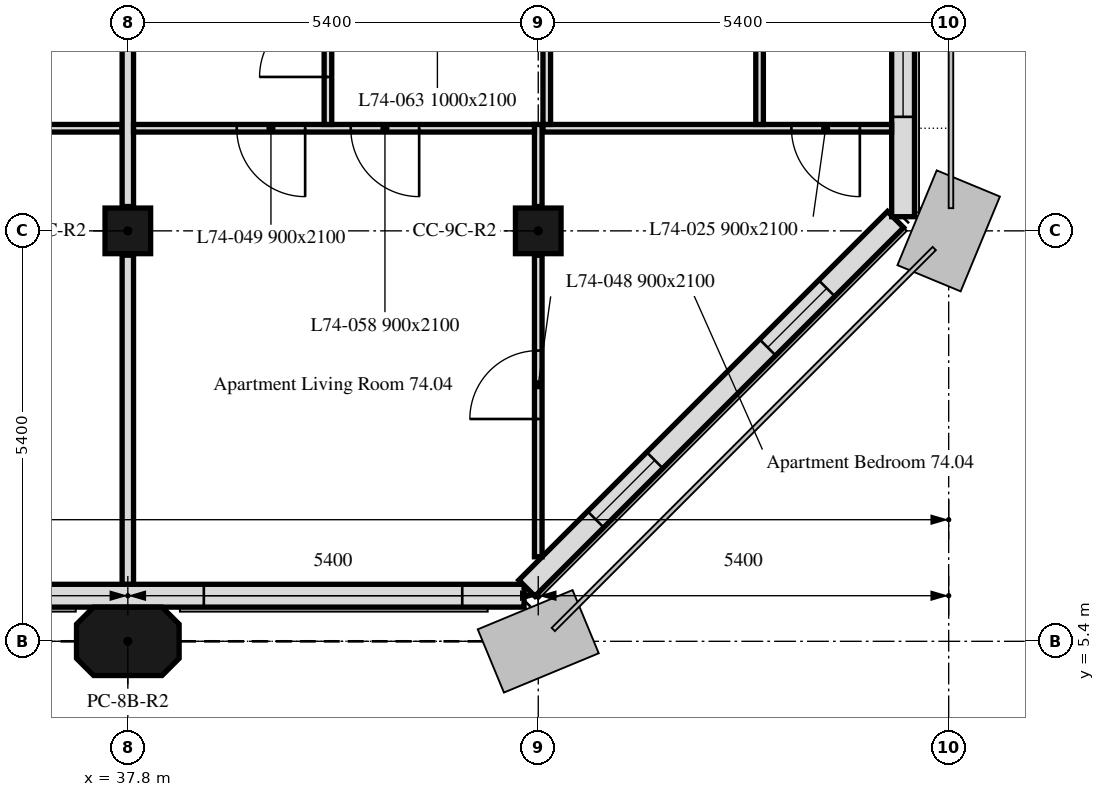
"""IFC4 building model, lengths in metres.
Left out: names, types, materials, properties, quantities, classifications, styles, units other than length and angle.
Written with IfcOpenShell. Run it as: python <this file> out.ifc"""

import sys

from ifc_helpers import new_model, si_unit, direction, frame, frame_2d, origin, origin_2d, place, context, subcontext, project, spatial, polyline, rectangle, outline, extrude, element, fill, save


model = new_model("IFC4")
c1 = context("Model", 3, precision=1e-05, world=origin(), true_north=direction((0.0, 1.0)))
c2 = subcontext(c1, "Body", "Model", "MODEL_VIEW")
j1 = project(units=[si_unit("LENGTHUNIT", "METRE"), si_unit("PLANEANGLEUNIT", "RADIAN")], contexts=[c1])
p1 = place(None, origin())
s1 = spatial("IfcSite", under=j1, at=p1, CompositionType="ELEMENT")
p2 = place(p1, origin())
s2 = spatial("IfcBuilding", under=s1, at=p2, CompositionType="ELEMENT")
p3 = place(p2, frame((0.0, 0.0, 298.3)))
s3 = spatial("IfcBuildingStorey", under=s2, at=p3, CompositionType="ELEMENT", Elevation=298.3)
p4 = place(p3, frame((37.8, 5.4, 0.0), z_axis=(0.0, 0.0, 1.0), x_axis=(1.0, 0.0, 0.0)))
e1 = element("IfcColumn", 1, at=p4, inside=s3, PredefinedType="COLUMN", context=c2, shape_type="SweptSolid", body=[
    extrude(outline(polyline([(-0.45, -0.45), (0.45, -0.45), (0.675, -0.225), (0.675, 0.225), (0.45, 0.45), (-0.45, 0.45), (-0.675, 0.225), (-0.675, -0.225), (-0.45, -0.45)])), origin(), (0.0, 0.0, 1.0), 3.0),
])
for number, where, z_axis, x_axis in (
    (2, (37.8, 10.8, 0.0), (0.0, 0.0, 1.0), (1.0, 0.0, 0.0)),
    (3, (43.2, 10.8, 0.0), (0.0, 0.0, 1.0), (1.0, 0.0, 0.0)),
):
    element("IfcColumn", number, at=place(p3, frame(where, z_axis=z_axis, x_axis=x_axis)), inside=s3, PredefinedType="COLUMN", context=c2, shape_type="SweptSolid", body=[
        extrude(rectangle(XDim=0.6, YDim=0.6, at=origin_2d()), origin(), (0.0, 0.0, 1.0), 3.0),
    ])
p5 = place(p3, frame((10.986, 6.0, 0.0), z_axis=(0.0, 0.0, 1.0), x_axis=(1.0, 0.0, 0.0)))
e4 = element("IfcWall", 4, at=p5, inside=s3, PredefinedType="SOLIDWALL", context=c2, shape_type="SweptSolid", body=[
    extrude(rectangle(XDim=32.027, YDim=0.3, at=frame_2d((16.014, 0.0))), origin(), (0.0, 0.0, 1.0), 3.0),
])
p6 = place(p5, frame((2.764, 0.0, 0.9)))
e5 = element("IfcOpeningElement", 5, at=p6, cuts=e4, PredefinedType="OPENING", context=c2, shape_type="SweptSolid", body=[
    extrude(rectangle(XDim=1.1, YDim=1.7, at=frame_2d((0.55, 0.85))), frame((0.0, 0.16, 0.0), z_axis=(0.0, -1.0, 0.0), x_axis=(1.0, 0.0, 0.0)), (0.0, 0.0, 1.0), 0.32),
])
p7 = place(p5, frame((6.214, 0.0, 0.9)))
e6 = element("IfcOpeningElement", 6, at=p7, cuts=e4, PredefinedType="OPENING", context=c2, shape_type="SweptSolid", body=[
    extrude(rectangle(XDim=3.4, YDim=1.7, at=frame_2d((1.7, 0.85))), frame((0.0, 0.16, 0.0), z_axis=(0.0, -1.0, 0.0), x_axis=(1.0, 0.0, 0.0)), (0.0, 0.0, 1.0), 0.32),
])
p8 = place(p5, frame((13.564, 0.0, 0.9)))
e7 = element("IfcOpeningElement", 7, at=p8, cuts=e4, PredefinedType="OPENING", context=c2, shape_type="SweptSolid", body=[
    extrude(rectangle(XDim=1.1, YDim=1.7, at=frame_2d((0.55, 0.85))), frame((0.0, 0.16, 0.0), z_axis=(0.0, -1.0, 0.0), x_axis=(1.0, 0.0, 0.0)), (0.0, 0.0, 1.0), 0.32),
])
p9 = place(p5, frame((17.014, 0.0, 0.9)))
e8 = element("IfcOpeningElement", 8, at=p9, cuts=e4, PredefinedType="OPENING", context=c2, shape_type="SweptSolid", body=[
    extrude(rectangle(XDim=3.4, YDim=1.7, at=frame_2d((1.7, 0.85))), frame((0.0, 0.16, 0.0), z_axis=(0.0, -1.0, 0.0), x_axis=(1.0, 0.0, 0.0)), (0.0, 0.0, 1.0), 0.32),
])
p10 = place(p5, frame((24.364, 0.0, 0.9)))
e9 = element("IfcOpeningElement", 9, at=p10, cuts=e4, PredefinedType="OPENING", context=c2, shape_type="SweptSolid", body=[
    extrude(rectangle(XDim=1.1, YDim=1.7, at=frame_2d((0.55, 0.85))), frame((0.0, 0.16, 0.0), z_axis=(0.0, -1.0, 0.0), x_axis=(1.0, 0.0, 0.0)), (0.0, 0.0, 1.0), 0.32),
])
p11 = place(p5, frame((27.814, 0.0, 0.9)))
e10 = element("IfcOpeningElement", 10, at=p11, cuts=e4, PredefinedType="OPENING", context=c2, shape_type="SweptSolid", body=[
    extrude(rectangle(XDim=3.4, YDim=1.7, at=frame_2d((1.7, 0.85))), frame((0.0, 0.16, 0.0), z_axis=(0.0, -1.0, 0.0), x_axis=(1.0, 0.0, 0.0)), (0.0, 0.0, 1.0), 0.32),
])
p12 = place(p3, frame((43.051, 6.099, 0.0), z_axis=(0.0, 0.0, 1.0), x_axis=(0.707106781187, 0.707106781187, 0.0)))
e11 = element("IfcWall", 11, at=p12, inside=s3, PredefinedType="SOLIDWALL", context=c2, shape_type="SweptSolid", body=[
    extrude(rectangle(XDim=6.86, YDim=0.3, at=frame_2d((3.43, 0.0))), origin(), (0.0, 0.0, 1.0), 3.0),
])
p13 = place(p12, frame((1.28, 0.0, 0.9)))
e12 = element("IfcOpeningElement", 12, at=p13, cuts=e11, PredefinedType="OPENING", context=c2, shape_type="SweptSolid", body=[
    extrude(rectangle(XDim=1.1, YDim=1.7, at=frame_2d((0.55, 0.85))), frame((0.0, 0.16, 0.0), z_axis=(0.0, -1.0, 0.0), x_axis=(1.0, 0.0, 0.0)), (0.0, 0.0, 1.0), 0.32),
])
p14 = place(p12, frame((4.48, 0.0, 0.9)))
e13 = element("IfcOpeningElement", 13, at=p14, cuts=e11, PredefinedType="OPENING", context=c2, shape_type="SweptSolid", body=[
    extrude(rectangle(XDim=1.1, YDim=1.7, at=frame_2d((0.55, 0.85))), frame((0.0, 0.16, 0.0), z_axis=(0.0, -1.0, 0.0), x_axis=(1.0, 0.0, 0.0)), (0.0, 0.0, 1.0), 0.32),
])
p15 = place(p3, frame((48.0, 10.986, 0.0), z_axis=(0.0, 0.0, 1.0), x_axis=(0.0, 1.0, 0.0)))
e14 = element("IfcWall", 14, at=p15, inside=s3, PredefinedType="SOLIDWALL", context=c2, shape_type="SweptSolid", body=[
    extrude(rectangle(XDim=32.027, YDim=0.3, at=frame_2d((16.014, 0.0))), origin(), (0.0, 0.0, 1.0), 3.0),
])
p16 = place(p15, frame((1.314, 0.0, 0.9)))
e15 = element("IfcOpeningElement", 15, at=p16, cuts=e14, PredefinedType="OPENING", context=c2, shape_type="SweptSolid", body=[
    extrude(rectangle(XDim=1.1, YDim=1.7, at=frame_2d((0.55, 0.85))), frame((0.0, 0.16, 0.0), z_axis=(0.0, -1.0, 0.0), x_axis=(1.0, 0.0, 0.0)), (0.0, 0.0, 1.0), 0.32),
])
p17 = place(p15, frame((2.589, 0.0, 0.9)))
e16 = element("IfcOpeningElement", 16, at=p17, cuts=e14, PredefinedType="OPENING", context=c2, shape_type="SweptSolid", body=[
    extrude(rectangle(XDim=0.65, YDim=1.7, at=frame_2d((0.325, 0.85))), frame((0.0, 0.16, 0.0), z_axis=(0.0, -1.0, 0.0), x_axis=(1.0, 0.0, 0.0)), (0.0, 0.0, 1.0), 0.32),
])
p18 = place(p15, frame((6.214, 0.0, 0.9)))
e17 = element("IfcOpeningElement", 17, at=p18, cuts=e14, PredefinedType="OPENING", context=c2, shape_type="SweptSolid", body=[
    extrude(rectangle(XDim=3.4, YDim=1.7, at=frame_2d((1.7, 0.85))), frame((0.0, 0.16, 0.0), z_axis=(0.0, -1.0, 0.0), x_axis=(1.0, 0.0, 0.0)), (0.0, 0.0, 1.0), 0.32),
])
p19 = place(p15, frame((11.964, 0.0, 0.9)))
e18 = element("IfcOpeningElement", 18, at=p19, cuts=e14, PredefinedType="OPENING", context=c2, shape_type="SweptSolid", body=[
    extrude(rectangle(XDim=1.1, YDim=1.7, at=frame_2d((0.55, 0.85))), frame((0.0, 0.16, 0.0), z_axis=(0.0, -1.0, 0.0), x_axis=(1.0, 0.0, 0.0)), (0.0, 0.0, 1.0), 0.32),
])
p20 = place(p15, frame((13.564, 0.0, 0.9)))
e19 = element("IfcOpeningElement", 19, at=p20, cuts=e14, PredefinedType="OPENING", context=c2, shape_type="SweptSolid", body=[
    extrude(rectangle(XDim=1.1, YDim=1.7, at=frame_2d((0.55, 0.85))), frame((0.0, 0.16, 0.0), z_axis=(0.0, -1.0, 0.0), x_axis=(1.0, 0.0, 0.0)), (0.0, 0.0, 1.0), 0.32),
])
p21 = place(p15, frame((17.014, 0.0, 0.9)))
e20 = element("IfcOpeningElement", 20, at=p21, cuts=e14, PredefinedType="OPENING", context=c2, shape_type="SweptSolid", body=[
    extrude(rectangle(XDim=3.4, YDim=1.7, at=frame_2d((1.7, 0.85))), frame((0.0, 0.16, 0.0), z_axis=(0.0, -1.0, 0.0), x_axis=(1.0, 0.0, 0.0)), (0.0, 0.0, 1.0), 0.32),
])
p22 = place(p15, frame((23.389, 0.0, 0.9)))
e21 = element("IfcOpeningElement", 21, at=p22, cuts=e14, PredefinedType="OPENING", context=c2, shape_type="SweptSolid", body=[
    extrude(rectangle(XDim=0.65, YDim=1.7, at=frame_2d((0.325, 0.85))), frame((0.0, 0.16, 0.0), z_axis=(0.0, -1.0, 0.0), x_axis=(1.0, 0.0, 0.0)), (0.0, 0.0, 1.0), 0.32),
])
p23 = place(p15, frame((24.364, 0.0, 0.9)))
e22 = element("IfcOpeningElement", 22, at=p23, cuts=e14, PredefinedType="OPENING", context=c2, shape_type="SweptSolid", body=[
    extrude(rectangle(XDim=1.1, YDim=1.7, at=frame_2d((0.55, 0.85))), frame((0.0, 0.16, 0.0), z_axis=(0.0, -1.0, 0.0), x_axis=(1.0, 0.0, 0.0)), (0.0, 0.0, 1.0), 0.32),
])
p24 = place(p15, frame((28.164, 0.0, 0.9)))
e23 = element("IfcOpeningElement", 23, at=p24, cuts=e14, PredefinedType="OPENING", context=c2, shape_type="SweptSolid", body=[
    extrude(rectangle(XDim=1.1, YDim=1.7, at=frame_2d((0.55, 0.85))), frame((0.0, 0.16, 0.0), z_axis=(0.0, -1.0, 0.0), x_axis=(1.0, 0.0, 0.0)), (0.0, 0.0, 1.0), 0.32),
])
p25 = place(p15, frame((29.764, 0.0, 0.9)))
e24 = element("IfcOpeningElement", 24, at=p25, cuts=e14, PredefinedType="OPENING", context=c2, shape_type="SweptSolid", body=[
    extrude(rectangle(XDim=1.1, YDim=1.7, at=frame_2d((0.55, 0.85))), frame((0.0, 0.16, 0.0), z_axis=(0.0, -1.0, 0.0), x_axis=(1.0, 0.0, 0.0)), (0.0, 0.0, 1.0), 0.32),
])
p26 = place(p3, frame((37.8, 6.151, 0.0), z_axis=(0.0, 0.0, 1.0), x_axis=(0.0, 1.0, 0.0)))
e25 = element("IfcWall", 25, at=p26, inside=s3, PredefinedType="PARTITIONING", context=c2, shape_type="SweptSolid", body=[
    extrude(rectangle(XDim=4.329, YDim=0.15, at=frame_2d((2.165, 0.0))), origin(), (0.0, 0.0, 1.0), 3.0),
])
p27 = place(p3, frame((37.725, 12.15, 0.0), z_axis=(0.0, 0.0, 1.0), x_axis=(-1.0, 0.0, 0.0)))
e26 = element("IfcWall", 26, at=p27, inside=s3, PredefinedType="PARTITIONING", context=c2, shape_type="SweptSolid", body=[
    extrude(rectangle(XDim=5.275, YDim=0.1, at=frame_2d((2.638, 0.0))), origin(), (0.0, 0.0, 1.0), 3.0),
])
p28 = place(p27, frame((2.155, 0.0, 0.0)))
e27 = element("IfcOpeningElement", 27, at=p28, cuts=e26, PredefinedType="OPENING", context=c2, shape_type="SweptSolid", body=[
    extrude(rectangle(XDim=0.9, YDim=2.1, at=frame_2d((0.45, 1.05))), frame((0.0, 0.05, 0.0), z_axis=(0.0, -1.0, 0.0), x_axis=(1.0, 0.0, 0.0)), (0.0, 0.0, 1.0), 0.1),
])
p29 = place(p3, frame((37.8, 11.12, 0.0), z_axis=(0.0, 0.0, 1.0), x_axis=(0.0, 1.0, 0.0)))
e28 = element("IfcWall", 28, at=p29, inside=s3, PredefinedType="PARTITIONING", context=c2, shape_type="SweptSolid", body=[
    extrude(rectangle(XDim=3.205, YDim=0.15, at=frame_2d((1.603, 0.0))), origin(), (0.0, 0.0, 1.0), 3.0),
])
p30 = place(p3, frame((43.2, 6.512, 0.0), z_axis=(0.0, 0.0, 1.0), x_axis=(0.0, 1.0, 0.0)))
e29 = element("IfcWall", 29, at=p30, inside=s3, PredefinedType="PARTITIONING", context=c2, shape_type="SweptSolid", body=[
    extrude(rectangle(XDim=3.968, YDim=0.1, at=frame_2d((1.984, 0.0))), origin(), (0.0, 0.0, 1.0), 3.0),
])
p31 = place(p30, frame((1.813, 0.0, 0.0)))
e30 = element("IfcOpeningElement", 30, at=p31, cuts=e29, PredefinedType="OPENING", context=c2, shape_type="SweptSolid", body=[
    extrude(rectangle(XDim=0.9, YDim=2.1, at=frame_2d((0.45, 1.05))), frame((0.0, 0.05, 0.0), z_axis=(0.0, -1.0, 0.0), x_axis=(1.0, 0.0, 0.0)), (0.0, 0.0, 1.0), 0.1),
])
p32 = place(p3, frame((43.2, 11.12, 0.0), z_axis=(0.0, 0.0, 1.0), x_axis=(0.0, 1.0, 0.0)))
e31 = element("IfcWall", 31, at=p32, inside=s3, PredefinedType="PARTITIONING", context=c2, shape_type="SweptSolid", body=[
    extrude(rectangle(XDim=1.08, YDim=0.1, at=frame_2d((0.54, 0.0))), origin(), (0.0, 0.0, 1.0), 3.0),
])
p33 = place(p3, frame((43.15, 12.15, 0.0), z_axis=(0.0, 0.0, 1.0), x_axis=(-1.0, 0.0, 0.0)))
e32 = element("IfcWall", 32, at=p33, inside=s3, PredefinedType="PARTITIONING", context=c2, shape_type="SweptSolid", body=[
    extrude(rectangle(XDim=5.275, YDim=0.1, at=frame_2d((2.637, 0.0))), origin(), (0.0, 0.0, 1.0), 3.0),
])
p34 = place(p33, frame((3.017, 0.0, 0.0)))
e33 = element("IfcOpeningElement", 33, at=p34, cuts=e32, PredefinedType="OPENING", context=c2, shape_type="SweptSolid", body=[
    extrude(rectangle(XDim=0.9, YDim=2.1, at=frame_2d((0.45, 1.05))), frame((0.0, 0.05, 0.0), z_axis=(0.0, -1.0, 0.0), x_axis=(1.0, 0.0, 0.0)), (0.0, 0.0, 1.0), 0.1),
])
p35 = place(p33, frame((1.517, 0.0, 0.0)))
e34 = element("IfcOpeningElement", 34, at=p35, cuts=e32, PredefinedType="OPENING", context=c2, shape_type="SweptSolid", body=[
    extrude(rectangle(XDim=0.9, YDim=2.1, at=frame_2d((0.45, 1.05))), frame((0.0, 0.05, 0.0), z_axis=(0.0, -1.0, 0.0), x_axis=(1.0, 0.0, 0.0)), (0.0, 0.0, 1.0), 0.1),
])
p36 = place(p3, frame((47.849, 12.15, 0.0), z_axis=(0.0, 0.0, 1.0), x_axis=(-1.0, 0.0, 0.0)))
e35 = element("IfcWall", 35, at=p36, inside=s3, PredefinedType="PARTITIONING", context=c2, shape_type="SweptSolid", body=[
    extrude(rectangle(XDim=4.587, YDim=0.1, at=frame_2d((2.293, 0.0))), origin(), (0.0, 0.0, 1.0), 3.0),
])
p37 = place(p36, frame((0.418, 0.0, 0.0)))
e36 = element("IfcOpeningElement", 36, at=p37, cuts=e35, PredefinedType="OPENING", context=c2, shape_type="SweptSolid", body=[
    extrude(rectangle(XDim=0.9, YDim=2.1, at=frame_2d((0.45, 1.05))), frame((0.0, 0.05, 0.0), z_axis=(0.0, -1.0, 0.0), x_axis=(1.0, 0.0, 0.0)), (0.0, 0.0, 1.0), 0.1),
])
p38 = place(p3, frame((40.433, 12.2, 0.0), z_axis=(0.0, 0.0, 1.0), x_axis=(0.0, 1.0, 0.0)))
e37 = element("IfcWall", 37, at=p38, inside=s3, PredefinedType="PARTITIONING", context=c2, shape_type="SweptSolid", body=[
    extrude(rectangle(XDim=2.125, YDim=0.1, at=frame_2d((1.062, 0.0))), origin(), (0.0, 0.0, 1.0), 3.0),
])
p39 = place(p38, frame((0.625, 0.0, 0.0)))
e38 = element("IfcOpeningElement", 38, at=p39, cuts=e37, PredefinedType="OPENING", context=c2, shape_type="SweptSolid", body=[
    extrude(rectangle(XDim=0.9, YDim=2.1, at=frame_2d((0.45, 1.05))), frame((0.0, 0.05, 0.0), z_axis=(0.0, -1.0, 0.0), x_axis=(1.0, 0.0, 0.0)), (0.0, 0.0, 1.0), 0.1),
])
p40 = place(p3, frame((43.312, 12.2, 0.0), z_axis=(0.0, 0.0, 1.0), x_axis=(0.0, 1.0, 0.0)))
e39 = element("IfcWall", 39, at=p40, inside=s3, PredefinedType="PARTITIONING", context=c2, shape_type="SweptSolid", body=[
    extrude(rectangle(XDim=2.125, YDim=0.1, at=frame_2d((1.062, 0.0))), origin(), (0.0, 0.0, 1.0), 3.0),
])
p41 = place(p40, frame((0.975, 0.0, 0.0)))
e40 = element("IfcOpeningElement", 40, at=p41, cuts=e39, PredefinedType="OPENING", context=c2, shape_type="SweptSolid", body=[
    extrude(rectangle(XDim=0.9, YDim=2.1, at=frame_2d((0.45, 1.05))), frame((0.0, 0.05, 0.0), z_axis=(0.0, -1.0, 0.0), x_axis=(1.0, 0.0, 0.0)), (0.0, 0.0, 1.0), 0.1),
])
p42 = place(p3, frame((46.112, 12.2, 0.0), z_axis=(0.0, 0.0, 1.0), x_axis=(0.0, 1.0, 0.0)))
e41 = element("IfcWall", 41, at=p42, inside=s3, PredefinedType="PARTITIONING", context=c2, shape_type="SweptSolid", body=[
    extrude(rectangle(XDim=2.125, YDim=0.1, at=frame_2d((1.062, 0.0))), origin(), (0.0, 0.0, 1.0), 3.0),
])
p43 = place(p11, origin())
e42 = element("IfcWindow", 42, at=p43, inside=s3, PartitioningType="SINGLE_PANEL", PredefinedType="WINDOW", context=c2, shape_type="SweptSolid", body=[
    extrude(rectangle(XDim=3.4, YDim=1.7, at=frame_2d((1.7, 0.85))), frame((0.0, 0.03, 0.0), z_axis=(0.0, -1.0, 0.0), x_axis=(1.0, 0.0, 0.0)), (0.0, 0.0, 1.0), 0.06),
])
fill(e10, e42)
p44 = place(p13, origin())
e43 = element("IfcWindow", 43, at=p44, inside=s3, PartitioningType="SINGLE_PANEL", PredefinedType="WINDOW", context=c2, shape_type="SweptSolid", body=[
    extrude(rectangle(XDim=1.1, YDim=1.7, at=frame_2d((0.55, 0.85))), frame((0.0, 0.03, 0.0), z_axis=(0.0, -1.0, 0.0), x_axis=(1.0, 0.0, 0.0)), (0.0, 0.0, 1.0), 0.06),
])
fill(e12, e43)
p45 = place(p14, origin())
e44 = element("IfcWindow", 44, at=p45, inside=s3, PartitioningType="SINGLE_PANEL", PredefinedType="WINDOW", context=c2, shape_type="SweptSolid", body=[
    extrude(rectangle(XDim=1.1, YDim=1.7, at=frame_2d((0.55, 0.85))), frame((0.0, 0.03, 0.0), z_axis=(0.0, -1.0, 0.0), x_axis=(1.0, 0.0, 0.0)), (0.0, 0.0, 1.0), 0.06),
])
fill(e13, e44)
p46 = place(p16, origin())
e45 = element("IfcWindow", 45, at=p46, inside=s3, PartitioningType="SINGLE_PANEL", PredefinedType="WINDOW", context=c2, shape_type="SweptSolid", body=[
    extrude(rectangle(XDim=1.1, YDim=1.7, at=frame_2d((0.55, 0.85))), frame((0.0, 0.03, 0.0), z_axis=(0.0, -1.0, 0.0), x_axis=(1.0, 0.0, 0.0)), (0.0, 0.0, 1.0), 0.06),
])
fill(e15, e45)
p47 = place(p37, origin())
e46 = element("IfcDoor", 46, at=p47, inside=s3, OperationType="SINGLE_SWING_RIGHT", PredefinedType="DOOR", context=c2, shape_type="SweptSolid", body=[
    extrude(rectangle(XDim=0.9, YDim=2.1, at=frame_2d((0.45, 1.05))), frame((0.0, 0.025, 0.0), z_axis=(0.0, -1.0, 0.0), x_axis=(1.0, 0.0, 0.0)), (0.0, 0.0, 1.0), 0.05),
])
fill(e36, e46)
p48 = place(p31, origin())
e47 = element("IfcDoor", 47, at=p48, inside=s3, OperationType="SINGLE_SWING_LEFT", PredefinedType="DOOR", context=c2, shape_type="SweptSolid", body=[
    extrude(rectangle(XDim=0.9, YDim=2.1, at=frame_2d((0.45, 1.05))), frame((0.0, 0.025, 0.0), z_axis=(0.0, -1.0, 0.0), x_axis=(1.0, 0.0, 0.0)), (0.0, 0.0, 1.0), 0.05),
])
fill(e30, e47)
p49 = place(p34, origin())
e48 = element("IfcDoor", 48, at=p49, inside=s3, OperationType="SINGLE_SWING_LEFT", PredefinedType="DOOR", context=c2, shape_type="SweptSolid", body=[
    extrude(rectangle(XDim=0.9, YDim=2.1, at=frame_2d((0.45, 1.05))), frame((0.0, 0.025, 0.0), z_axis=(0.0, -1.0, 0.0), x_axis=(1.0, 0.0, 0.0)), (0.0, 0.0, 1.0), 0.05),
])
fill(e33, e48)
p50 = place(p39, origin())
e49 = element("IfcDoor", 49, at=p50, inside=s3, OperationType="SINGLE_SWING_LEFT", PredefinedType="DOOR", context=c2, shape_type="SweptSolid", body=[
    extrude(rectangle(XDim=0.9, YDim=2.1, at=frame_2d((0.45, 1.05))), frame((0.0, 0.025, 0.0), z_axis=(0.0, -1.0, 0.0), x_axis=(1.0, 0.0, 0.0)), (0.0, 0.0, 1.0), 0.05),
])
fill(e38, e49)
p51 = place(p35, origin())
e50 = element("IfcDoor", 50, at=p51, inside=s3, OperationType="SINGLE_SWING_RIGHT", PredefinedType="DOOR", context=c2, shape_type="SweptSolid", body=[
    extrude(rectangle(XDim=0.9, YDim=2.1, at=frame_2d((0.45, 1.05))), frame((0.0, 0.025, 0.0), z_axis=(0.0, -1.0, 0.0), x_axis=(1.0, 0.0, 0.0)), (0.0, 0.0, 1.0), 0.05),
])
fill(e34, e50)
save(model, sys.argv[1])
